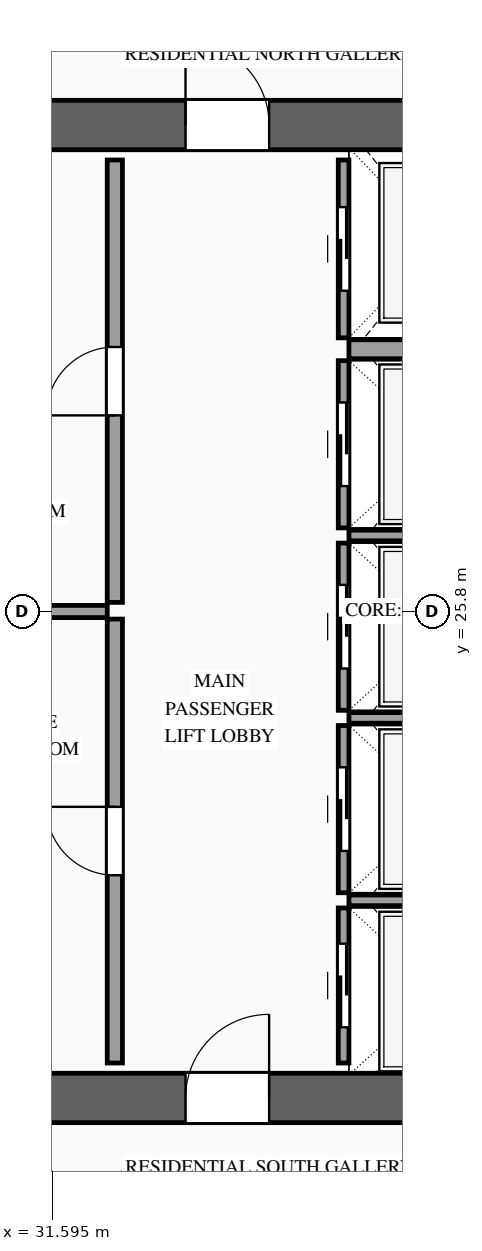
"""IFC4 building model, lengths in metres.
Left out: names, types, materials, properties, quantities, classifications, styles, units other than length and angle.
Written with IfcOpenShell. Run it as: python <this file> out.ifc"""

import sys

from ifc_helpers import new_model, si_unit, direction, frame, frame_2d, origin, place, context, subcontext, project, spatial, rectangle, extrude, source, transform, mapped, element, fill, save


model = new_model("IFC4")
c1 = context("Model", 3, precision=1e-05, world=origin(), true_north=direction((0.0, 1.0)))
c2 = subcontext(c1, "Body", "Model", "MODEL_VIEW")
j1 = project(units=[si_unit("LENGTHUNIT", "METRE"), si_unit("PLANEANGLEUNIT", "RADIAN")], contexts=[c1])
p1 = place(None, origin())
s1 = spatial("IfcSite", under=j1, at=p1, CompositionType="ELEMENT")
p2 = place(p1, origin())
s2 = spatial("IfcBuilding", under=s1, at=p2, CompositionType="ELEMENT")
p3 = place(p2, frame((0.0, 0.0, 184.5)))
s3 = spatial("IfcBuildingStorey", under=s2, at=p3, CompositionType="ELEMENT", Elevation=184.5)
p4 = place(p3, frame((23.475, 19.4, 0.0), z_axis=(0.0, 0.0, 1.0), x_axis=(1.0, 0.0, 0.0)))
e1 = element("IfcWall", 1, at=p4, inside=s3, PredefinedType="SHEAR", context=c2, shape_type="SweptSolid", body=[
    extrude(rectangle(XDim=27.05, YDim=0.65, at=frame_2d((13.525, 0.0))), origin(), (0.0, 0.0, 1.0), 3.5),
])
p5 = place(p4, frame((1.975, 0.0, 0.0)))
e2 = element("IfcOpeningElement", 2, at=p5, cuts=e1, PredefinedType="OPENING", context=c2, shape_type="SweptSolid", body=[
    extrude(rectangle(XDim=1.1, YDim=2.2, at=frame_2d((0.55, 1.1))), frame((0.0, 0.34, 0.0), z_axis=(0.0, -1.0, 0.0), x_axis=(1.0, 0.0, 0.0)), (0.0, 0.0, 1.0), 0.68),
])
p6 = place(p4, frame((9.875, 0.0, 0.0)))
e3 = element("IfcOpeningElement", 3, at=p6, cuts=e1, PredefinedType="OPENING", context=c2, shape_type="SweptSolid", body=[
    extrude(rectangle(XDim=1.1, YDim=2.2, at=frame_2d((0.55, 1.1))), frame((0.0, 0.34, 0.0), z_axis=(0.0, -1.0, 0.0), x_axis=(1.0, 0.0, 0.0)), (0.0, 0.0, 1.0), 0.68),
])
p7 = place(p4, frame((23.075, 0.0, 0.0)))
e4 = element("IfcOpeningElement", 4, at=p7, cuts=e1, PredefinedType="OPENING", context=c2, shape_type="SweptSolid", body=[
    extrude(rectangle(XDim=1.1, YDim=2.2, at=frame_2d((0.55, 1.1))), frame((0.0, 0.34, 0.0), z_axis=(0.0, -1.0, 0.0), x_axis=(1.0, 0.0, 0.0)), (0.0, 0.0, 1.0), 0.68),
])
p8 = place(p4, frame((19.695, 0.0, 0.0)))
e5 = element("IfcOpeningElement", 5, at=p8, cuts=e1, PredefinedType="OPENING", context=c2, shape_type="SweptSolid", body=[
    extrude(rectangle(XDim=0.9, YDim=2.15, at=frame_2d((0.45, 1.075))), frame((0.0, 0.34, 0.0), z_axis=(0.0, -1.0, 0.0), x_axis=(1.0, 0.0, 0.0)), (0.0, 0.0, 1.0), 0.68),
])
p9 = place(p4, frame((18.255, 0.0, 0.0)))
e6 = element("IfcOpeningElement", 6, at=p9, cuts=e1, PredefinedType="OPENING", context=c2, shape_type="SweptSolid", body=[
    extrude(rectangle(XDim=0.9, YDim=2.15, at=frame_2d((0.45, 1.075))), frame((0.0, 0.34, 0.0), z_axis=(0.0, -1.0, 0.0), x_axis=(1.0, 0.0, 0.0)), (0.0, 0.0, 1.0), 0.68),
])
p10 = place(p3, frame((23.475, 32.2, 0.0), z_axis=(0.0, 0.0, 1.0), x_axis=(1.0, 0.0, 0.0)))
e7 = element("IfcWall", 7, at=p10, inside=s3, PredefinedType="SHEAR", context=c2, shape_type="SweptSolid", body=[
    extrude(rectangle(XDim=27.05, YDim=0.65, at=frame_2d((13.525, 0.0))), origin(), (0.0, 0.0, 1.0), 3.5),
])
p11 = place(p10, frame((4.595, 0.0, 0.0)))
e8 = element("IfcOpeningElement", 8, at=p11, cuts=e7, PredefinedType="OPENING", context=c2, shape_type="SweptSolid", body=[
    extrude(rectangle(XDim=0.9, YDim=2.15, at=frame_2d((0.45, 1.075))), frame((0.0, 0.34, 0.0), z_axis=(0.0, -1.0, 0.0), x_axis=(1.0, 0.0, 0.0)), (0.0, 0.0, 1.0), 0.68),
])
p12 = place(p10, frame((9.875, 0.0, 0.0)))
e9 = element("IfcOpeningElement", 9, at=p12, cuts=e7, PredefinedType="OPENING", context=c2, shape_type="SweptSolid", body=[
    extrude(rectangle(XDim=1.1, YDim=2.2, at=frame_2d((0.55, 1.1))), frame((0.0, 0.34, 0.0), z_axis=(0.0, -1.0, 0.0), x_axis=(1.0, 0.0, 0.0)), (0.0, 0.0, 1.0), 0.68),
])
p13 = place(p10, frame((15.725, 0.0, 0.0)))
e10 = element("IfcOpeningElement", 10, at=p13, cuts=e7, PredefinedType="OPENING", context=c2, shape_type="SweptSolid", body=[
    extrude(rectangle(XDim=1.1, YDim=2.2, at=frame_2d((0.55, 1.1))), frame((0.0, 0.34, 0.0), z_axis=(0.0, -1.0, 0.0), x_axis=(1.0, 0.0, 0.0)), (0.0, 0.0, 1.0), 0.68),
])
p14 = place(p10, frame((19.695, 0.0, 0.0)))
e11 = element("IfcOpeningElement", 11, at=p14, cuts=e7, PredefinedType="OPENING", context=c2, shape_type="SweptSolid", body=[
    extrude(rectangle(XDim=0.9, YDim=2.15, at=frame_2d((0.45, 1.075))), frame((0.0, 0.34, 0.0), z_axis=(0.0, -1.0, 0.0), x_axis=(1.0, 0.0, 0.0)), (0.0, 0.0, 1.0), 0.68),
])
p15 = place(p3, frame((35.43, 19.86, 0.0), z_axis=(0.0, 0.0, 1.0), x_axis=(0.0, 1.0, 0.0)))
e12 = element("IfcWall", 12, at=p15, inside=s3, PredefinedType="SOLIDWALL", context=c2, shape_type="SweptSolid", body=[
    extrude(rectangle(XDim=2.04, YDim=0.14, at=frame_2d((1.02, 0.0))), origin(), (0.0, 0.0, 1.0), 3.28),
])
p16 = place(p15, frame((0.47, 0.0, 0.0)))
e13 = element("IfcOpeningElement", 13, at=p16, cuts=e12, PredefinedType="OPENING", context=c2, shape_type="SweptSolid", body=[
    extrude(rectangle(XDim=1.1, YDim=2.2, at=frame_2d((0.55, 1.1))), frame((0.0, 0.085, 0.0), z_axis=(0.0, -1.0, 0.0), x_axis=(1.0, 0.0, 0.0)), (0.0, 0.0, 1.0), 0.17),
])
m1 = source(origin(), c2, "Body", "SweptSolid", [
    extrude(rectangle(XDim=2.4, YDim=0.14, at=frame_2d((1.2, 0.0))), origin(), (0.0, 0.0, 1.0), 3.28),
])
p17 = place(p3, frame((35.5, 22.0, 0.0), z_axis=(0.0, 0.0, 1.0), x_axis=(1.0, 0.0, 0.0)))
e14 = element("IfcWall", 14, at=p17, inside=s3, PredefinedType="SOLIDWALL", context=c2, shape_type="MappedRepresentation", body=[
    mapped(m1, transform((0.0, 0.0, 0.0), scale=1.0)),
])
p18 = place(p3, frame((35.43, 22.1, 0.0), z_axis=(0.0, 0.0, 1.0), x_axis=(0.0, 1.0, 0.0)))
e15 = element("IfcWall", 15, at=p18, inside=s3, PredefinedType="SOLIDWALL", context=c2, shape_type="SweptSolid", body=[
    extrude(rectangle(XDim=2.2, YDim=0.14, at=frame_2d((1.1, 0.0))), origin(), (0.0, 0.0, 1.0), 3.28),
])
p19 = place(p18, frame((0.55, 0.0, 0.0)))
e16 = element("IfcOpeningElement", 16, at=p19, cuts=e15, PredefinedType="OPENING", context=c2, shape_type="SweptSolid", body=[
    extrude(rectangle(XDim=1.1, YDim=2.2, at=frame_2d((0.55, 1.1))), frame((0.0, 0.085, 0.0), z_axis=(0.0, -1.0, 0.0), x_axis=(1.0, 0.0, 0.0)), (0.0, 0.0, 1.0), 0.17),
])
p20 = place(p3, frame((35.5, 24.4, 0.0), z_axis=(0.0, 0.0, 1.0), x_axis=(1.0, 0.0, 0.0)))
e17 = element("IfcWall", 17, at=p20, inside=s3, PredefinedType="SOLIDWALL", context=c2, shape_type="MappedRepresentation", body=[
    mapped(m1, transform((0.0, 0.0, 0.0), scale=1.0)),
])
p21 = place(p3, frame((35.43, 24.5, 0.0), z_axis=(0.0, 0.0, 1.0), x_axis=(0.0, 1.0, 0.0)))
e18 = element("IfcWall", 18, at=p21, inside=s3, PredefinedType="SOLIDWALL", context=c2, shape_type="SweptSolid", body=[
    extrude(rectangle(XDim=2.2, YDim=0.14, at=frame_2d((1.1, 0.0))), origin(), (0.0, 0.0, 1.0), 3.28),
])
p22 = place(p21, frame((0.55, 0.0, 0.0)))
e19 = element("IfcOpeningElement", 19, at=p22, cuts=e18, PredefinedType="OPENING", context=c2, shape_type="SweptSolid", body=[
    extrude(rectangle(XDim=1.1, YDim=2.2, at=frame_2d((0.55, 1.1))), frame((0.0, 0.085, 0.0), z_axis=(0.0, -1.0, 0.0), x_axis=(1.0, 0.0, 0.0)), (0.0, 0.0, 1.0), 0.17),
])
p23 = place(p3, frame((35.5, 26.8, 0.0), z_axis=(0.0, 0.0, 1.0), x_axis=(1.0, 0.0, 0.0)))
e20 = element("IfcWall", 20, at=p23, inside=s3, PredefinedType="SOLIDWALL", context=c2, shape_type="MappedRepresentation", body=[
    mapped(m1, transform((0.0, 0.0, 0.0), scale=1.0)),
])
p24 = place(p3, frame((35.43, 26.9, 0.0), z_axis=(0.0, 0.0, 1.0), x_axis=(0.0, 1.0, 0.0)))
e21 = element("IfcWall", 21, at=p24, inside=s3, PredefinedType="SOLIDWALL", context=c2, shape_type="SweptSolid", body=[
    extrude(rectangle(XDim=2.2, YDim=0.14, at=frame_2d((1.1, 0.0))), origin(), (0.0, 0.0, 1.0), 3.28),
])
p25 = place(p24, frame((0.55, 0.0, 0.0)))
e22 = element("IfcOpeningElement", 22, at=p25, cuts=e21, PredefinedType="OPENING", context=c2, shape_type="SweptSolid", body=[
    extrude(rectangle(XDim=1.1, YDim=2.2, at=frame_2d((0.55, 1.1))), frame((0.0, 0.085, 0.0), z_axis=(0.0, -1.0, 0.0), x_axis=(1.0, 0.0, 0.0)), (0.0, 0.0, 1.0), 0.17),
])
p26 = place(p3, frame((35.43, 29.4, 0.0), z_axis=(0.0, 0.0, 1.0), x_axis=(0.0, 1.0, 0.0)))
e23 = element("IfcWall", 23, at=p26, inside=s3, PredefinedType="SOLIDWALL", context=c2, shape_type="SweptSolid", body=[
    extrude(rectangle(XDim=2.34, YDim=0.14, at=frame_2d((1.17, 0.0))), origin(), (0.0, 0.0, 1.0), 3.28),
])
p27 = place(p26, frame((0.62, 0.0, 0.0)))
e24 = element("IfcOpeningElement", 24, at=p27, cuts=e23, PredefinedType="OPENING", context=c2, shape_type="SweptSolid", body=[
    extrude(rectangle(XDim=1.1, YDim=2.2, at=frame_2d((0.55, 1.1))), frame((0.0, 0.085, 0.0), z_axis=(0.0, -1.0, 0.0), x_axis=(1.0, 0.0, 0.0)), (0.0, 0.0, 1.0), 0.17),
])
m2 = source(origin(), c2, "Body", "SweptSolid", [
    extrude(rectangle(XDim=2.4, YDim=0.25, at=frame_2d((1.2, 0.0))), origin(), (0.0, 0.0, 1.0), 3.28),
])
p28 = place(p3, frame((35.5, 29.25, 0.0), z_axis=(0.0, 0.0, 1.0), x_axis=(1.0, 0.0, 0.0)))
e25 = element("IfcWall", 25, at=p28, inside=s3, PredefinedType="SOLIDWALL", context=c2, shape_type="MappedRepresentation", body=[
    mapped(m2, transform((0.0, 0.0, 0.0), scale=1.0)),
])
p29 = place(p3, frame((32.42, 19.86, 0.0), z_axis=(0.0, 0.0, 1.0), x_axis=(0.0, 1.0, 0.0)))
e26 = element("IfcWall", 26, at=p29, inside=s3, PredefinedType="PARTITIONING", context=c2, shape_type="SweptSolid", body=[
    extrude(rectangle(XDim=5.84, YDim=0.2, at=frame_2d((2.92, 0.0))), origin(), (0.0, 0.0, 1.0), 3.28),
])
p30 = place(p29, frame((2.47, 0.0, 0.0)))
e27 = element("IfcOpeningElement", 27, at=p30, cuts=e26, PredefinedType="OPENING", context=c2, shape_type="SweptSolid", body=[
    extrude(rectangle(XDim=0.9, YDim=2.15, at=frame_2d((0.45, 1.075))), frame((0.0, 0.115, 0.0), z_axis=(0.0, -1.0, 0.0), x_axis=(1.0, 0.0, 0.0)), (0.0, 0.0, 1.0), 0.23),
])
p31 = place(p3, frame((32.42, 25.92, 0.0), z_axis=(0.0, 0.0, 1.0), x_axis=(0.0, 1.0, 0.0)))
e28 = element("IfcWall", 28, at=p31, inside=s3, PredefinedType="PARTITIONING", context=c2, shape_type="SweptSolid", body=[
    extrude(rectangle(XDim=5.82, YDim=0.2, at=frame_2d((2.91, 0.0))), origin(), (0.0, 0.0, 1.0), 3.28),
])
p32 = place(p31, frame((2.46, 0.0, 0.0)))
e29 = element("IfcOpeningElement", 29, at=p32, cuts=e28, PredefinedType="OPENING", context=c2, shape_type="SweptSolid", body=[
    extrude(rectangle(XDim=0.9, YDim=2.15, at=frame_2d((0.45, 1.075))), frame((0.0, 0.115, 0.0), z_axis=(0.0, -1.0, 0.0), x_axis=(1.0, 0.0, 0.0)), (0.0, 0.0, 1.0), 0.23),
])
m3 = source(origin(), c2, "Body", "SweptSolid", [
    extrude(rectangle(XDim=2.47, YDim=0.16, at=frame_2d((1.235, 0.0))), origin(), (0.0, 0.0, 1.0), 3.28),
])
p33 = place(p3, frame((29.85, 25.8, 0.0), z_axis=(0.0, 0.0, 1.0), x_axis=(1.0, 0.0, 0.0)))
e30 = element("IfcWall", 30, at=p33, inside=s3, PredefinedType="PARTITIONING", context=c2, shape_type="MappedRepresentation", body=[
    mapped(m3, transform((0.0, 0.0, 0.0), scale=1.0)),
])
m4 = source(origin(), c2, "Body", "SweptSolid", [
    extrude(rectangle(XDim=1.1, YDim=2.2, at=frame_2d((0.55, 1.1))), frame((0.0, 0.025, 0.0), z_axis=(0.0, -1.0, 0.0), x_axis=(1.0, 0.0, 0.0)), (0.0, 0.0, 1.0), 0.05),
])
p34 = place(p16, origin())
e31 = element("IfcDoor", 31, at=p34, inside=s3, OperationType="SLIDING_TO_RIGHT", PredefinedType="DOOR", context=c2, shape_type="MappedRepresentation", body=[
    mapped(m4, transform((0.0, 0.0, 0.0), scale=1.0)),
])
fill(e13, e31)
p35 = place(p19, origin())
e32 = element("IfcDoor", 32, at=p35, inside=s3, OperationType="SLIDING_TO_LEFT", PredefinedType="DOOR", context=c2, shape_type="MappedRepresentation", body=[
    mapped(m4, transform((0.0, 0.0, 0.0), scale=1.0)),
])
fill(e16, e32)
p36 = place(p22, origin())
e33 = element("IfcDoor", 33, at=p36, inside=s3, OperationType="SLIDING_TO_RIGHT", PredefinedType="DOOR", context=c2, shape_type="MappedRepresentation", body=[
    mapped(m4, transform((0.0, 0.0, 0.0), scale=1.0)),
])
fill(e19, e33)
p37 = place(p25, origin())
e34 = element("IfcDoor", 34, at=p37, inside=s3, OperationType="SLIDING_TO_LEFT", PredefinedType="DOOR", context=c2, shape_type="MappedRepresentation", body=[
    mapped(m4, transform((0.0, 0.0, 0.0), scale=1.0)),
])
fill(e22, e34)
p38 = place(p27, origin())
e35 = element("IfcDoor", 35, at=p38, inside=s3, OperationType="SLIDING_TO_RIGHT", PredefinedType="DOOR", context=c2, shape_type="MappedRepresentation", body=[
    mapped(m4, transform((0.0, 0.0, 0.0), scale=1.0)),
])
fill(e24, e35)
m5 = source(origin(), c2, "Body", "SweptSolid", [
    extrude(rectangle(XDim=1.1, YDim=2.2, at=frame_2d((0.55, 1.1))), frame((0.0, 0.025, 0.0), z_axis=(0.0, -1.0, 0.0), x_axis=(1.0, 0.0, 0.0)), (0.0, 0.0, 1.0), 0.05),
])
p39 = place(p6, origin())
e36 = element("IfcDoor", 36, at=p39, inside=s3, OperationType="SINGLE_SWING_RIGHT", PredefinedType="DOOR", context=c2, shape_type="MappedRepresentation", body=[
    mapped(m5, transform((0.0, 0.0, 0.0), scale=1.0)),
])
fill(e3, e36)
p40 = place(p12, origin())
e37 = element("IfcDoor", 37, at=p40, inside=s3, OperationType="SINGLE_SWING_LEFT", PredefinedType="DOOR", context=c2, shape_type="MappedRepresentation", body=[
    mapped(m5, transform((0.0, 0.0, 0.0), scale=1.0)),
])
fill(e9, e37)
m6 = source(origin(), c2, "Body", "SweptSolid", [
    extrude(rectangle(XDim=0.9, YDim=2.15, at=frame_2d((0.45, 1.075))), frame((0.0, 0.025, 0.0), z_axis=(0.0, -1.0, 0.0), x_axis=(1.0, 0.0, 0.0)), (0.0, 0.0, 1.0), 0.05),
])
p41 = place(p30, origin())
e38 = element("IfcDoor", 38, at=p41, inside=s3, OperationType="SINGLE_SWING_RIGHT", PredefinedType="DOOR", context=c2, shape_type="MappedRepresentation", body=[
    mapped(m6, transform((0.0, 0.0, 0.0), scale=1.0)),
])
fill(e27, e38)
p42 = place(p32, origin())
e39 = element("IfcDoor", 39, at=p42, inside=s3, OperationType="SINGLE_SWING_LEFT", PredefinedType="DOOR", context=c2, shape_type="MappedRepresentation", body=[
    mapped(m6, transform((0.0, 0.0, 0.0), scale=1.0)),
])
fill(e29, e39)
save(model, sys.argv[1])
